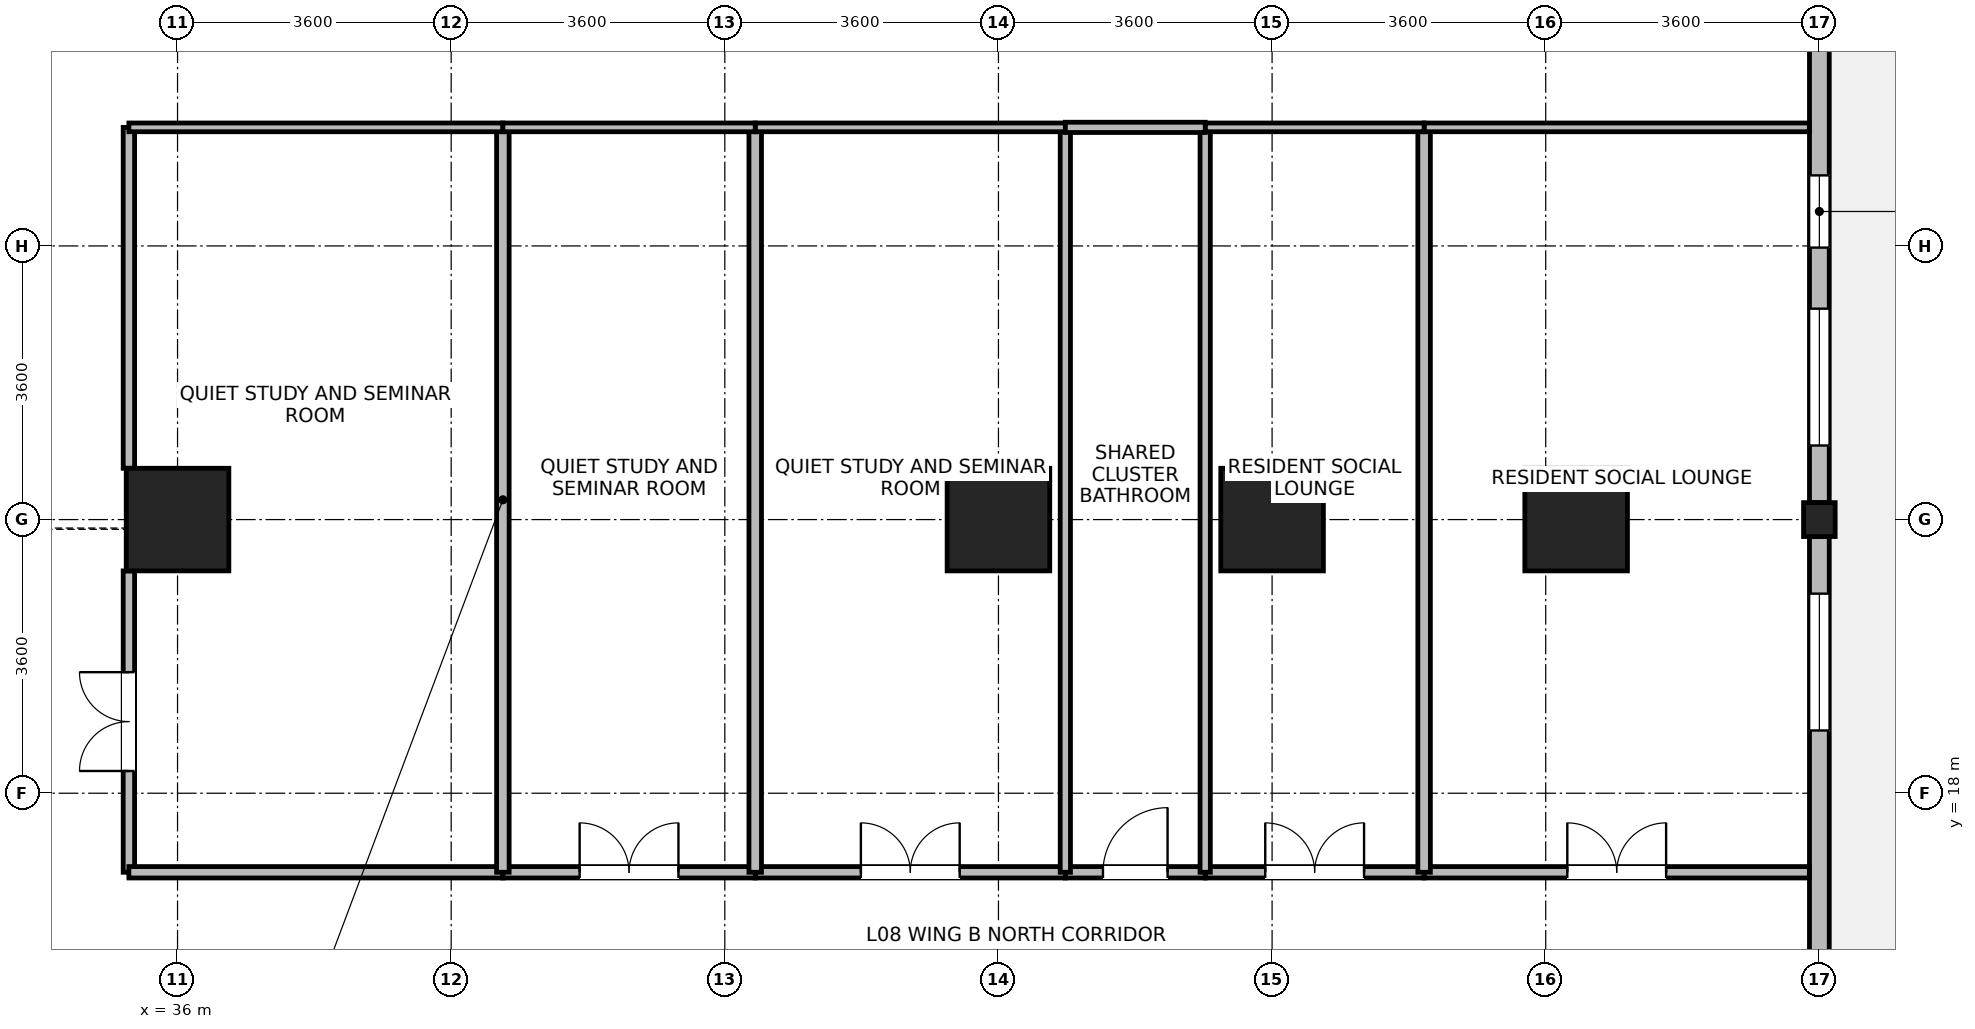
"""IFC4 building model, lengths in metres.
Left out: names, types, materials, properties, quantities, classifications, styles, units other than length and angle.
Written with IfcOpenShell. Run it as: python <this file> out.ifc"""

import sys

from ifc_helpers import new_model, si_unit, direction, frame, frame_2d, origin, origin_2d, place, context, subcontext, project, spatial, rectangle, i_section, extrude, source, transform, mapped, element, fill, save


model = new_model("IFC4")
c1 = context("Model", 3, precision=1e-05, world=origin(), true_north=direction((0.0, 1.0)))
c2 = subcontext(c1, "Body", "Model", "MODEL_VIEW")
j1 = project(units=[si_unit("LENGTHUNIT", "METRE"), si_unit("PLANEANGLEUNIT", "RADIAN")], contexts=[c1])
p1 = place(None, origin())
s1 = spatial("IfcSite", under=j1, at=p1, CompositionType="ELEMENT")
p2 = place(p1, origin())
s2 = spatial("IfcBuilding", under=s1, at=p2, CompositionType="ELEMENT")
p3 = place(p2, frame((0.0, 0.0, 36.4)))
s3 = spatial("IfcBuildingStorey", under=s2, at=p3, CompositionType="ELEMENT", Elevation=36.4)
m1 = source(origin(), c2, "Body", "SweptSolid", [
    extrude(rectangle(XDim=1.35, YDim=1.35, at=origin_2d()), origin(), (0.0, 0.0, 1.0), 3.7),
])
for number, where, z_axis, x_axis in (
    (1, (36.0, 21.6, 0.0), (0.0, 0.0, 1.0), (1.0, 0.0, 0.0)),
    (2, (46.8, 21.6, 0.0), (0.0, 0.0, 1.0), (1.0, 0.0, 0.0)),
    (3, (50.4, 21.6, 0.0), (0.0, 0.0, 1.0), (1.0, 0.0, 0.0)),
    (4, (54.4, 21.6, 0.0), (0.0, 0.0, 1.0), (1.0, 0.0, 0.0)),
):
    element("IfcColumn", number, at=place(p3, frame(where, z_axis=z_axis, x_axis=x_axis)), inside=s3, PredefinedType="COLUMN", context=c2, shape_type="MappedRepresentation", body=[
        mapped(m1, transform((0.0, 0.0, 0.0), x_axis=(1.0, 0.0, 0.0), y_axis=(0.0, 1.0, 0.0), z_axis=(0.0, 0.0, 1.0), scale=1.0)),
    ])
m2 = source(origin(), c2, "Body", "SweptSolid", [
    extrude(i_section(OverallWidth=0.416, OverallDepth=0.446, WebThickness=0.029, FlangeThickness=0.04, FilletRadius=0.015, at=origin_2d()), origin(), (0.0, 0.0, 1.0), 3.7),
])
p4 = place(p3, frame((57.6, 21.6, 0.0), z_axis=(0.0, 0.0, 1.0), x_axis=(1.0, 0.0, 0.0)))
e5 = element("IfcColumn", 5, at=p4, inside=s3, PredefinedType="COLUMN", context=c2, shape_type="MappedRepresentation", body=[
    mapped(m2, transform((0.0, 0.0, 0.0), x_axis=(1.0, 0.0, 0.0), y_axis=(0.0, 1.0, 0.0), z_axis=(0.0, 0.0, 1.0), scale=1.0)),
])
p5 = place(p3, frame((57.6, 21.376, 0.0), z_axis=(0.0, 0.0, 1.0), x_axis=(0.0, -1.0, 0.0)))
e6 = element("IfcWall", 6, at=p5, inside=s3, PredefinedType="STANDARD", context=c2, shape_type="SweptSolid", body=[
    extrude(rectangle(XDim=6.602, YDim=0.26, at=frame_2d((3.301, 0.0))), origin(), (0.0, 0.0, 1.0), 2.93),
])
p6 = place(p5, frame((0.75, 0.0, 0.85)))
e7 = element("IfcOpeningElement", 7, at=p6, cuts=e6, PredefinedType="OPENING", context=c2, shape_type="SweptSolid", body=[
    extrude(rectangle(XDim=1.8, YDim=1.85, at=frame_2d((0.9, 0.925))), frame((0.0, 0.14, 0.0), z_axis=(0.0, -1.0, 0.0), x_axis=(1.0, 0.0, 0.0)), (0.0, 0.0, 1.0), 0.28),
])
p7 = place(p3, frame((57.6, 28.426, 0.0), z_axis=(0.0, 0.0, 1.0), x_axis=(0.0, -1.0, 0.0)))
e8 = element("IfcWall", 8, at=p7, inside=s3, PredefinedType="STANDARD", context=c2, shape_type="SweptSolid", body=[
    extrude(rectangle(XDim=6.602, YDim=0.26, at=frame_2d((3.301, 0.0))), origin(), (0.0, 0.0, 1.0), 2.93),
])
p8 = place(p7, frame((4.052, 0.0, 0.85)))
e9 = element("IfcOpeningElement", 9, at=p8, cuts=e8, PredefinedType="OPENING", context=c2, shape_type="SweptSolid", body=[
    extrude(rectangle(XDim=1.8, YDim=1.85, at=frame_2d((0.9, 0.925))), frame((0.0, 0.14, 0.0), z_axis=(0.0, -1.0, 0.0), x_axis=(1.0, 0.0, 0.0)), (0.0, 0.0, 1.0), 0.28),
])
p9 = place(p7, frame((2.298, 0.0, 0.85)))
e10 = element("IfcOpeningElement", 10, at=p9, cuts=e8, PredefinedType="OPENING", context=c2, shape_type="SweptSolid", body=[
    extrude(rectangle(XDim=0.95, YDim=1.75, at=frame_2d((0.475, 0.875))), frame((0.0, 0.14, 0.0), z_axis=(0.0, -1.0, 0.0), x_axis=(1.0, 0.0, 0.0)), (0.0, 0.0, 1.0), 0.28),
])
p10 = place(p3, frame((35.36, 16.96, 0.0), z_axis=(0.0, 0.0, 1.0), x_axis=(0.0, 1.0, 0.0)))
e11 = element("IfcWall", 11, at=p10, inside=s3, PredefinedType="PARTITIONING", context=c2, shape_type="SweptSolid", body=[
    extrude(rectangle(XDim=3.965, YDim=0.15, at=frame_2d((1.982, 0.0))), origin(), (0.0, 0.0, 1.0), 3.43),
])
p11 = place(p10, frame((1.333, 0.0, 0.0)))
e12 = element("IfcOpeningElement", 12, at=p11, cuts=e11, PredefinedType="OPENING", context=c2, shape_type="SweptSolid", body=[
    extrude(rectangle(XDim=1.3, YDim=2.12, at=frame_2d((0.65, 1.06))), frame((0.0, 0.085, 0.0), z_axis=(0.0, -1.0, 0.0), x_axis=(1.0, 0.0, 0.0)), (0.0, 0.0, 1.0), 0.17),
])
p12 = place(p3, frame((35.36, 22.275, 0.0), z_axis=(0.0, 0.0, 1.0), x_axis=(0.0, 1.0, 0.0)))
e13 = element("IfcWall", 13, at=p12, inside=s3, PredefinedType="PARTITIONING", context=c2, shape_type="SweptSolid", body=[
    extrude(rectangle(XDim=4.485, YDim=0.15, at=frame_2d((2.243, 0.0))), origin(), (0.0, 0.0, 1.0), 3.43),
])
p13 = place(p3, frame((52.4, 16.96, 0.0), z_axis=(0.0, 0.0, 1.0), x_axis=(1.0, 0.0, 0.0)))
e14 = element("IfcWall", 14, at=p13, inside=s3, PredefinedType="PARTITIONING", context=c2, shape_type="SweptSolid", body=[
    extrude(rectangle(XDim=5.068, YDim=0.15, at=frame_2d((2.534, 0.0))), origin(), (0.0, 0.0, 1.0), 3.43),
])
p14 = place(p13, frame((1.884, 0.0, 0.0)))
e15 = element("IfcOpeningElement", 15, at=p14, cuts=e14, PredefinedType="OPENING", context=c2, shape_type="SweptSolid", body=[
    extrude(rectangle(XDim=1.3, YDim=2.12, at=frame_2d((0.65, 1.06))), frame((0.0, 0.085, 0.0), z_axis=(0.0, -1.0, 0.0), x_axis=(1.0, 0.0, 0.0)), (0.0, 0.0, 1.0), 0.17),
])
p15 = place(p3, frame((35.36, 16.96, 0.0), z_axis=(0.0, 0.0, 1.0), x_axis=(1.0, 0.0, 0.0)))
e16 = element("IfcWall", 16, at=p15, inside=s3, PredefinedType="PARTITIONING", context=c2, shape_type="SweptSolid", body=[
    extrude(rectangle(XDim=4.92, YDim=0.15, at=frame_2d((2.46, 0.0))), origin(), (0.0, 0.0, 1.0), 3.43),
])
p16 = place(p3, frame((43.6, 16.96, 0.0), z_axis=(0.0, 0.0, 1.0), x_axis=(1.0, 0.0, 0.0)))
e17 = element("IfcWall", 17, at=p16, inside=s3, PredefinedType="PARTITIONING", context=c2, shape_type="SweptSolid", body=[
    extrude(rectangle(XDim=4.08, YDim=0.15, at=frame_2d((2.04, 0.0))), origin(), (0.0, 0.0, 1.0), 3.43),
])
p17 = place(p16, frame((1.39, 0.0, 0.0)))
e18 = element("IfcOpeningElement", 18, at=p17, cuts=e17, PredefinedType="OPENING", context=c2, shape_type="SweptSolid", body=[
    extrude(rectangle(XDim=1.3, YDim=2.12, at=frame_2d((0.65, 1.06))), frame((0.0, 0.085, 0.0), z_axis=(0.0, -1.0, 0.0), x_axis=(1.0, 0.0, 0.0)), (0.0, 0.0, 1.0), 0.17),
])
p18 = place(p3, frame((40.28, 16.96, 0.0), z_axis=(0.0, 0.0, 1.0), x_axis=(1.0, 0.0, 0.0)))
e19 = element("IfcWall", 19, at=p18, inside=s3, PredefinedType="PARTITIONING", context=c2, shape_type="SweptSolid", body=[
    extrude(rectangle(XDim=3.32, YDim=0.15, at=frame_2d((1.66, 0.0))), origin(), (0.0, 0.0, 1.0), 3.43),
])
p19 = place(p18, frame((1.01, 0.0, 0.0)))
e20 = element("IfcOpeningElement", 20, at=p19, cuts=e19, PredefinedType="OPENING", context=c2, shape_type="SweptSolid", body=[
    extrude(rectangle(XDim=1.3, YDim=2.12, at=frame_2d((0.65, 1.06))), frame((0.0, 0.085, 0.0), z_axis=(0.0, -1.0, 0.0), x_axis=(1.0, 0.0, 0.0)), (0.0, 0.0, 1.0), 0.17),
])
p20 = place(p3, frame((49.52, 16.96, 0.0), z_axis=(0.0, 0.0, 1.0), x_axis=(1.0, 0.0, 0.0)))
e21 = element("IfcWall", 21, at=p20, inside=s3, PredefinedType="PARTITIONING", context=c2, shape_type="SweptSolid", body=[
    extrude(rectangle(XDim=2.88, YDim=0.15, at=frame_2d((1.44, 0.0))), origin(), (0.0, 0.0, 1.0), 3.43),
])
p21 = place(p20, frame((0.79, 0.0, 0.0)))
e22 = element("IfcOpeningElement", 22, at=p21, cuts=e21, PredefinedType="OPENING", context=c2, shape_type="SweptSolid", body=[
    extrude(rectangle(XDim=1.3, YDim=2.12, at=frame_2d((0.65, 1.06))), frame((0.0, 0.085, 0.0), z_axis=(0.0, -1.0, 0.0), x_axis=(1.0, 0.0, 0.0)), (0.0, 0.0, 1.0), 0.17),
])
p22 = place(p3, frame((47.68, 16.96, 0.0), z_axis=(0.0, 0.0, 1.0), x_axis=(1.0, 0.0, 0.0)))
e23 = element("IfcWall", 23, at=p22, inside=s3, PredefinedType="PARTITIONING", context=c2, shape_type="SweptSolid", body=[
    extrude(rectangle(XDim=1.84, YDim=0.15, at=frame_2d((0.92, 0.0))), origin(), (0.0, 0.0, 1.0), 3.43),
])
p23 = place(p22, frame((0.495, 0.0, 0.0)))
e24 = element("IfcOpeningElement", 24, at=p23, cuts=e23, PredefinedType="OPENING", context=c2, shape_type="SweptSolid", body=[
    extrude(rectangle(XDim=0.85, YDim=2.04, at=frame_2d((0.425, 1.02))), frame((0.0, 0.085, 0.0), z_axis=(0.0, -1.0, 0.0), x_axis=(1.0, 0.0, 0.0)), (0.0, 0.0, 1.0), 0.17),
])
for number, where, z_axis, x_axis in (
    (25, (40.28, 16.96, 0.0), (0.0, 0.0, 1.0), (0.0, 1.0, 0.0)),
    (26, (43.6, 16.96, 0.0), (0.0, 0.0, 1.0), (0.0, 1.0, 0.0)),
):
    element("IfcWall", number, at=place(p3, frame(where, z_axis=z_axis, x_axis=x_axis)), inside=s3, PredefinedType="PARTITIONING", context=c2, shape_type="SweptSolid", body=[
        extrude(rectangle(XDim=9.8, YDim=0.165, at=frame_2d((4.9, 0.0))), origin(), (0.0, 0.0, 1.0), 3.43),
    ])
for number, where, z_axis, x_axis in (
    (27, (47.68, 16.96, 0.0), (0.0, 0.0, 1.0), (0.0, 1.0, 0.0)),
    (28, (49.52, 16.96, 0.0), (0.0, 0.0, 1.0), (0.0, 1.0, 0.0)),
):
    element("IfcWall", number, at=place(p3, frame(where, z_axis=z_axis, x_axis=x_axis)), inside=s3, PredefinedType="PARTITIONING", context=c2, shape_type="SweptSolid", body=[
        extrude(rectangle(XDim=9.8, YDim=0.135, at=frame_2d((4.9, 0.0))), origin(), (0.0, 0.0, 1.0), 3.43),
    ])
p24 = place(p3, frame((52.4, 16.96, 0.0), z_axis=(0.0, 0.0, 1.0), x_axis=(0.0, 1.0, 0.0)))
e29 = element("IfcWall", 29, at=p24, inside=s3, PredefinedType="PARTITIONING", context=c2, shape_type="SweptSolid", body=[
    extrude(rectangle(XDim=9.8, YDim=0.165, at=frame_2d((4.9, 0.0))), origin(), (0.0, 0.0, 1.0), 3.43),
])
p25 = place(p3, frame((52.4, 26.76, 0.0), z_axis=(0.0, 0.0, 1.0), x_axis=(1.0, 0.0, 0.0)))
e30 = element("IfcWall", 30, at=p25, inside=s3, PredefinedType="PARTITIONING", context=c2, shape_type="SweptSolid", body=[
    extrude(rectangle(XDim=5.068, YDim=0.115, at=frame_2d((2.534, 0.0))), origin(), (0.0, 0.0, 1.0), 3.43),
])
p26 = place(p3, frame((35.36, 26.76, 0.0), z_axis=(0.0, 0.0, 1.0), x_axis=(1.0, 0.0, 0.0)))
e31 = element("IfcWall", 31, at=p26, inside=s3, PredefinedType="PARTITIONING", context=c2, shape_type="SweptSolid", body=[
    extrude(rectangle(XDim=4.92, YDim=0.115, at=frame_2d((2.46, 0.0))), origin(), (0.0, 0.0, 1.0), 3.43),
])
p27 = place(p3, frame((43.6, 26.76, 0.0), z_axis=(0.0, 0.0, 1.0), x_axis=(1.0, 0.0, 0.0)))
e32 = element("IfcWall", 32, at=p27, inside=s3, PredefinedType="PARTITIONING", context=c2, shape_type="SweptSolid", body=[
    extrude(rectangle(XDim=4.08, YDim=0.115, at=frame_2d((2.04, 0.0))), origin(), (0.0, 0.0, 1.0), 3.43),
])
p28 = place(p3, frame((40.28, 26.76, 0.0), z_axis=(0.0, 0.0, 1.0), x_axis=(1.0, 0.0, 0.0)))
e33 = element("IfcWall", 33, at=p28, inside=s3, PredefinedType="PARTITIONING", context=c2, shape_type="SweptSolid", body=[
    extrude(rectangle(XDim=3.32, YDim=0.115, at=frame_2d((1.66, 0.0))), origin(), (0.0, 0.0, 1.0), 3.43),
])
p29 = place(p3, frame((49.52, 26.76, 0.0), z_axis=(0.0, 0.0, 1.0), x_axis=(1.0, 0.0, 0.0)))
e34 = element("IfcWall", 34, at=p29, inside=s3, PredefinedType="PARTITIONING", context=c2, shape_type="SweptSolid", body=[
    extrude(rectangle(XDim=2.88, YDim=0.115, at=frame_2d((1.44, 0.0))), origin(), (0.0, 0.0, 1.0), 3.43),
])
p30 = place(p3, frame((47.68, 26.76, 0.0), z_axis=(0.0, 0.0, 1.0), x_axis=(1.0, 0.0, 0.0)))
e35 = element("IfcWall", 35, at=p30, inside=s3, PredefinedType="PARTITIONING", context=c2, shape_type="SweptSolid", body=[
    extrude(rectangle(XDim=1.84, YDim=0.135, at=frame_2d((0.92, 0.0))), origin(), (0.0, 0.0, 1.0), 3.43),
])
p31 = place(p6, origin())
e36 = element("IfcWindow", 36, at=p31, inside=s3, PartitioningType="SINGLE_PANEL", PredefinedType="WINDOW", context=c2, shape_type="SweptSolid", body=[
    extrude(rectangle(XDim=1.8, YDim=1.85, at=frame_2d((0.9, 0.925))), frame((0.0, 0.03, 0.0), z_axis=(0.0, -1.0, 0.0), x_axis=(1.0, 0.0, 0.0)), (0.0, 0.0, 1.0), 0.06),
])
fill(e7, e36)
p32 = place(p8, origin())
e37 = element("IfcWindow", 37, at=p32, inside=s3, PartitioningType="SINGLE_PANEL", PredefinedType="WINDOW", context=c2, shape_type="SweptSolid", body=[
    extrude(rectangle(XDim=1.8, YDim=1.85, at=frame_2d((0.9, 0.925))), frame((0.0, 0.03, 0.0), z_axis=(0.0, -1.0, 0.0), x_axis=(1.0, 0.0, 0.0)), (0.0, 0.0, 1.0), 0.06),
])
fill(e9, e37)
p33 = place(p9, origin())
e38 = element("IfcWindow", 38, at=p33, inside=s3, PartitioningType="SINGLE_PANEL", PredefinedType="WINDOW", context=c2, shape_type="SweptSolid", body=[
    extrude(rectangle(XDim=0.95, YDim=1.75, at=frame_2d((0.475, 0.875))), frame((0.0, 0.03, 0.0), z_axis=(0.0, -1.0, 0.0), x_axis=(1.0, 0.0, 0.0)), (0.0, 0.0, 1.0), 0.06),
])
fill(e10, e38)
p34 = place(p11, origin())
e39 = element("IfcDoor", 39, at=p34, inside=s3, OperationType="DOUBLE_DOOR_SINGLE_SWING", PredefinedType="DOOR", context=c2, shape_type="SweptSolid", body=[
    extrude(rectangle(XDim=1.3, YDim=2.12, at=frame_2d((0.65, 1.06))), frame((0.0, 0.025, 0.0), z_axis=(0.0, -1.0, 0.0), x_axis=(1.0, 0.0, 0.0)), (0.0, 0.0, 1.0), 0.05),
])
fill(e12, e39)
p35 = place(p14, origin())
e40 = element("IfcDoor", 40, at=p35, inside=s3, OperationType="DOUBLE_DOOR_SINGLE_SWING", PredefinedType="DOOR", context=c2, shape_type="SweptSolid", body=[
    extrude(rectangle(XDim=1.3, YDim=2.12, at=frame_2d((0.65, 1.06))), frame((0.0, 0.025, 0.0), z_axis=(0.0, -1.0, 0.0), x_axis=(1.0, 0.0, 0.0)), (0.0, 0.0, 1.0), 0.05),
])
fill(e15, e40)
p36 = place(p17, origin())
e41 = element("IfcDoor", 41, at=p36, inside=s3, OperationType="DOUBLE_DOOR_SINGLE_SWING", PredefinedType="DOOR", context=c2, shape_type="SweptSolid", body=[
    extrude(rectangle(XDim=1.3, YDim=2.12, at=frame_2d((0.65, 1.06))), frame((0.0, 0.025, 0.0), z_axis=(0.0, -1.0, 0.0), x_axis=(1.0, 0.0, 0.0)), (0.0, 0.0, 1.0), 0.05),
])
fill(e18, e41)
p37 = place(p19, origin())
e42 = element("IfcDoor", 42, at=p37, inside=s3, OperationType="DOUBLE_DOOR_SINGLE_SWING", PredefinedType="DOOR", context=c2, shape_type="SweptSolid", body=[
    extrude(rectangle(XDim=1.3, YDim=2.12, at=frame_2d((0.65, 1.06))), frame((0.0, 0.025, 0.0), z_axis=(0.0, -1.0, 0.0), x_axis=(1.0, 0.0, 0.0)), (0.0, 0.0, 1.0), 0.05),
])
fill(e20, e42)
p38 = place(p21, origin())
e43 = element("IfcDoor", 43, at=p38, inside=s3, OperationType="DOUBLE_DOOR_SINGLE_SWING", PredefinedType="DOOR", context=c2, shape_type="SweptSolid", body=[
    extrude(rectangle(XDim=1.3, YDim=2.12, at=frame_2d((0.65, 1.06))), frame((0.0, 0.025, 0.0), z_axis=(0.0, -1.0, 0.0), x_axis=(1.0, 0.0, 0.0)), (0.0, 0.0, 1.0), 0.05),
])
fill(e22, e43)
p39 = place(p23, origin())
e44 = element("IfcDoor", 44, at=p39, inside=s3, OperationType="SINGLE_SWING_RIGHT", PredefinedType="DOOR", context=c2, shape_type="SweptSolid", body=[
    extrude(rectangle(XDim=0.85, YDim=2.04, at=frame_2d((0.425, 1.02))), frame((0.0, 0.025, 0.0), z_axis=(0.0, -1.0, 0.0), x_axis=(1.0, 0.0, 0.0)), (0.0, 0.0, 1.0), 0.05),
])
fill(e24, e44)
save(model, sys.argv[1])
